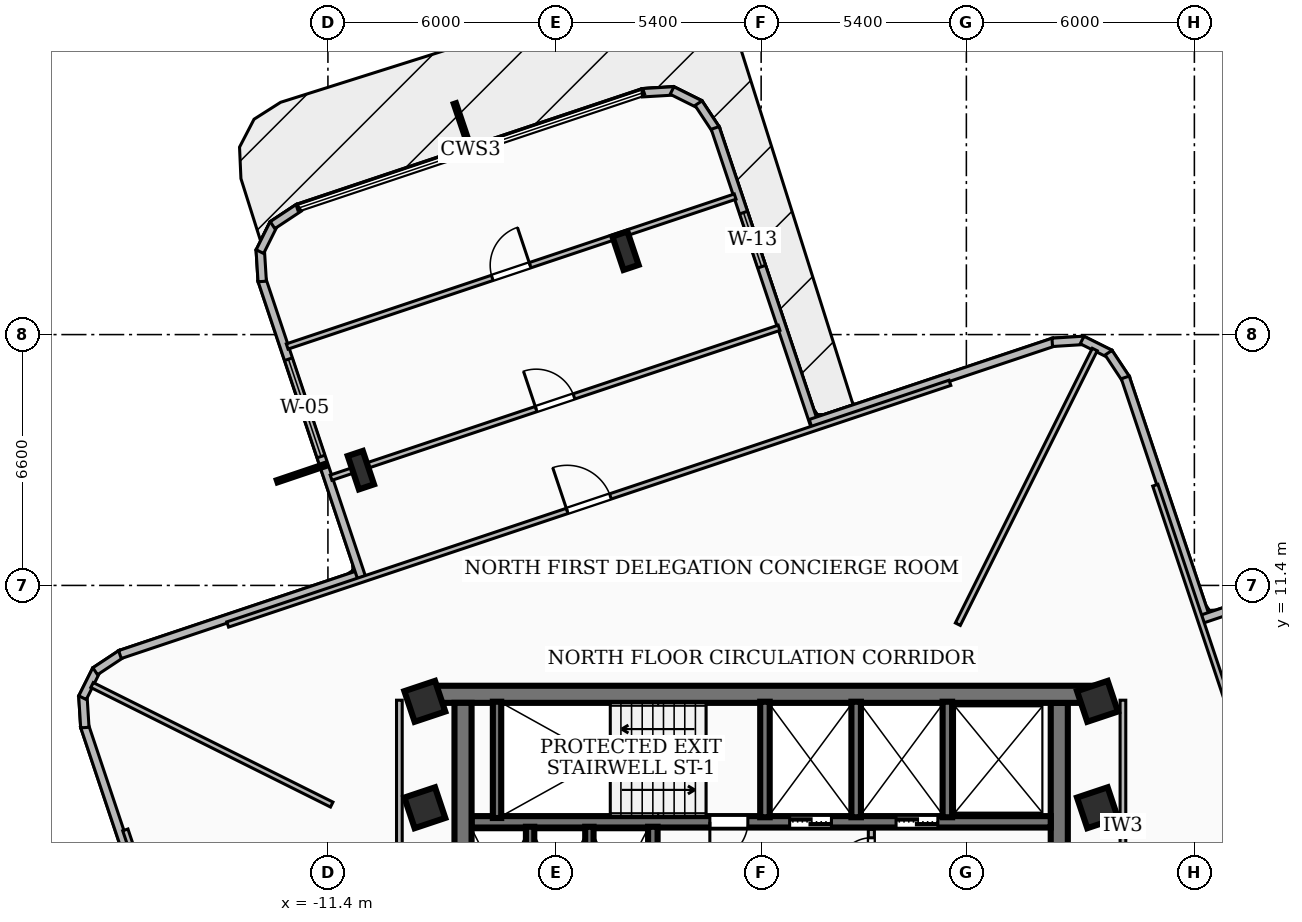
"""IFC4 building model, lengths in metres.
Left out: names, types, materials, properties, quantities, classifications, styles, units other than length and angle.
Written with IfcOpenShell. Run it as: python <this file> out.ifc"""

import sys

from ifc_helpers import new_model, si_unit, direction, frame, frame_2d, origin, origin_2d, place, context, subcontext, project, spatial, rectangle, i_section, extrude, element, fill, save


model = new_model("IFC4")
c1 = context("Model", 3, precision=1e-05, world=origin(), true_north=direction((0.0, 1.0)))
c2 = subcontext(c1, "Body", "Model", "MODEL_VIEW")
j1 = project(units=[si_unit("LENGTHUNIT", "METRE"), si_unit("PLANEANGLEUNIT", "RADIAN")], contexts=[c1])
p1 = place(None, origin())
s1 = spatial("IfcSite", under=j1, at=p1, CompositionType="ELEMENT")
p2 = place(p1, origin())
s2 = spatial("IfcBuilding", under=s1, at=p2, CompositionType="ELEMENT")
p3 = place(p2, frame((0.0, 0.0, 155.88)))
s3 = spatial("IfcBuildingStorey", under=s2, at=p3, CompositionType="ELEMENT", Elevation=155.88)
p4 = place(p3, frame((-8.78, 8.535, 0.0), z_axis=(0.0, 0.0, 1.0), x_axis=(1.0, 0.0, 0.0)))
e1 = element("IfcWall", 1, at=p4, inside=s3, PredefinedType="SHEAR", context=c2, shape_type="SweptSolid", body=[
    extrude(rectangle(XDim=17.56, YDim=0.45, at=frame_2d((8.78, 0.0))), origin(), (0.0, 0.0, 1.0), 3.34),
])
for number, where, z_axis, x_axis in (
    (2, (-7.845, 1.975, 0.0), (0.0, 0.0, 1.0), (0.0, 1.0, 0.0)),
    (3, (7.845, 8.31, 0.0), (0.0, 0.0, 1.0), (0.0, -1.0, 0.0)),
):
    element("IfcWall", number, at=place(p3, frame(where, z_axis=z_axis, x_axis=x_axis)), inside=s3, PredefinedType="SHEAR", context=c2, shape_type="SweptSolid", body=[
        extrude(rectangle(XDim=6.335, YDim=0.45, at=frame_2d((3.167, 0.0))), origin(), (0.0, 0.0, 1.0), 3.34),
    ])
p5 = place(p3, frame((7.62, 5.18, 0.0), z_axis=(0.0, 0.0, 1.0), x_axis=(-1.0, 0.0, 0.0)))
e4 = element("IfcWall", 4, at=p5, inside=s3, PredefinedType="SOLIDWALL", context=c2, shape_type="SweptSolid", body=[
    extrude(rectangle(XDim=15.24, YDim=0.3, at=frame_2d((7.62, 0.0))), origin(), (0.0, 0.0, 1.0), 3.34),
])
p6 = place(p5, frame((5.77, 0.0, 0.0)))
e5 = element("IfcOpeningElement", 5, at=p6, cuts=e4, PredefinedType="OPENING", context=c2, shape_type="SweptSolid", body=[
    extrude(rectangle(XDim=1.1, YDim=2.15, at=frame_2d((0.55, 1.075))), frame((0.0, 0.16, 0.0), z_axis=(0.0, -1.0, 0.0), x_axis=(1.0, 0.0, 0.0)), (0.0, 0.0, 1.0), 0.32),
])
p7 = place(p5, frame((2.97, 0.0, 0.0)))
e6 = element("IfcOpeningElement", 6, at=p7, cuts=e4, PredefinedType="OPENING", context=c2, shape_type="SweptSolid", body=[
    extrude(rectangle(XDim=1.1, YDim=2.15, at=frame_2d((0.55, 1.075))), frame((0.0, 0.16, 0.0), z_axis=(0.0, -1.0, 0.0), x_axis=(1.0, 0.0, 0.0)), (0.0, 0.0, 1.0), 0.32),
])
p8 = place(p5, frame((7.97, 0.0, 0.0)))
e7 = element("IfcOpeningElement", 7, at=p8, cuts=e4, PredefinedType="OPENING", context=c2, shape_type="SweptSolid", body=[
    extrude(rectangle(XDim=1.0, YDim=2.1, at=frame_2d((0.5, 1.05))), frame((0.0, 0.16, 0.0), z_axis=(0.0, -1.0, 0.0), x_axis=(1.0, 0.0, 0.0)), (0.0, 0.0, 1.0), 0.32),
])
p9 = place(p3, frame((-6.95, 5.28, 0.0), z_axis=(0.0, 0.0, 1.0), x_axis=(0.0, 1.0, 0.0)))
e8 = element("IfcWall", 8, at=p9, inside=s3, PredefinedType="SOLIDWALL", context=c2, shape_type="SweptSolid", body=[
    extrude(rectangle(XDim=3.06, YDim=0.22, at=frame_2d((1.53, 0.0))), origin(), (0.0, 0.0, 1.0), 3.34),
])
for number, where, z_axis, x_axis in (
    (9, (0.1, 5.3, 0.0), (0.0, 0.0, 1.0), (0.0, 1.0, 0.0)),
    (10, (2.5, 5.3, 0.0), (0.0, 0.0, 1.0), (0.0, 1.0, 0.0)),
    (11, (4.9, 5.3, 0.0), (0.0, 0.0, 1.0), (0.0, 1.0, 0.0)),
):
    element("IfcWall", number, at=place(p3, frame(where, z_axis=z_axis, x_axis=x_axis)), inside=s3, PredefinedType="SOLIDWALL", context=c2, shape_type="SweptSolid", body=[
        extrude(rectangle(XDim=3.04, YDim=0.25, at=frame_2d((1.52, 0.0))), origin(), (0.0, 0.0, 1.0), 3.34),
    ])
p10 = place(p3, frame((-2.85, 1.98, 0.0), z_axis=(0.0, 0.0, 1.0), x_axis=(0.0, 1.0, 0.0)))
e12 = element("IfcWall", 12, at=p10, inside=s3, PredefinedType="SOLIDWALL", context=c2, shape_type="SweptSolid", body=[
    extrude(rectangle(XDim=3.07, YDim=0.25, at=frame_2d((1.535, 0.0))), origin(), (0.0, 0.0, 1.0), 3.34),
])
for number, where, z_axis, x_axis in (
    (13, (-6.08, 1.98, 0.0), (0.0, 0.0, 1.0), (0.0, 1.0, 0.0)),
    (14, (-4.52, 1.98, 0.0), (0.0, 0.0, 1.0), (0.0, 1.0, 0.0)),
):
    element("IfcWall", number, at=place(p3, frame(where, z_axis=z_axis, x_axis=x_axis)), inside=s3, PredefinedType="SOLIDWALL", context=c2, shape_type="SweptSolid", body=[
        extrude(rectangle(XDim=3.07, YDim=0.22, at=frame_2d((1.535, 0.0))), origin(), (0.0, 0.0, 1.0), 3.34),
    ])
for number, where, z_axis, x_axis in (
    (15, (-8.85, 5.55, 0.0), (0.0, 0.0, 1.0), (0.948, 0.317, 0.0)),
    (16, (8.85, 5.55, 0.0), (0.0, 0.0, 1.0), (0.948, 0.317, 0.0)),
    (17, (-8.85, 8.35, 0.0), (0.0, 0.0, 1.0), (0.948, 0.317, 0.0)),
    (18, (8.85, 8.35, 0.0), (0.0, 0.0, 1.0), (0.948, 0.317, 0.0)),
):
    element("IfcColumn", number, at=place(p3, frame(where, z_axis=z_axis, x_axis=x_axis)), inside=s3, PredefinedType="COLUMN", context=c2, shape_type="SweptSolid", body=[
        extrude(rectangle(XDim=0.85, YDim=0.85, at=origin_2d()), origin(), (0.0, 0.0, 1.0), 3.6),
    ])
for number, where, z_axis, x_axis in (
    (19, (-3.57, 20.207, 0.0), (0.0, 0.0, 1.0), (0.948, 0.317, 0.0)),
    (20, (-10.533, 14.433, 0.0), (0.0, 0.0, 1.0), (0.948, 0.317, 0.0)),
):
    element("IfcColumn", number, at=place(p3, frame(where, z_axis=z_axis, x_axis=x_axis)), inside=s3, PredefinedType="COLUMN", context=c2, shape_type="SweptSolid", body=[
        extrude(i_section(OverallWidth=0.418, OverallDepth=0.927, WebThickness=0.019, FlangeThickness=0.032, at=origin_2d()), origin(), (0.0, 0.0, 1.0), 3.6),
    ])
p11 = place(p3, frame((-15.662, 1.3, 0.0), z_axis=(0.0, 0.0, 1.0), x_axis=(-0.317224676093, 0.948350412494, 0.0)))
e21 = element("IfcWall", 21, at=p11, inside=s3, PredefinedType="SOLIDWALL", context=c2, shape_type="SweptSolid", body=[
    extrude(rectangle(XDim=6.758, YDim=0.22, at=frame_2d((3.379, 0.0))), origin(), (0.0, 0.0, 1.0), 3.34),
])
p12 = place(p3, frame((-17.796, 7.66, 0.0), z_axis=(0.0, 0.0, 1.0), x_axis=(-0.062305442082, 0.998057128569, 0.0)))
e22 = element("IfcWall", 22, at=p12, inside=s3, PredefinedType="SOLIDWALL", context=c2, shape_type="SweptSolid", body=[
    extrude(rectangle(XDim=0.835, YDim=0.22, at=frame_2d((0.417, 0.0))), origin(), (0.0, 0.0, 1.0), 3.34),
])
p13 = place(p3, frame((-17.857, 8.446, 0.0), z_axis=(0.0, 0.0, 1.0), x_axis=(0.446258139106, 0.894904281631, 0.0)))
e23 = element("IfcWall", 23, at=p13, inside=s3, PredefinedType="SOLIDWALL", context=c2, shape_type="SweptSolid", body=[
    extrude(rectangle(XDim=0.818, YDim=0.22, at=frame_2d((0.409, 0.0))), origin(), (0.0, 0.0, 1.0), 3.34),
])
p14 = place(p3, frame((-17.524, 9.142, 0.0), z_axis=(0.0, 0.0, 1.0), x_axis=(0.833756011094, 0.552133058206, 0.0)))
e24 = element("IfcWall", 24, at=p14, inside=s3, PredefinedType="SOLIDWALL", context=c2, shape_type="SweptSolid", body=[
    extrude(rectangle(XDim=0.835, YDim=0.22, at=frame_2d((0.417, 0.0))), origin(), (0.0, 0.0, 1.0), 3.34),
])
p15 = place(p3, frame((-16.873, 9.581, 0.0), z_axis=(0.0, 0.0, 1.0), x_axis=(0.94829606055, 0.317387116224, 0.0)))
e25 = element("IfcWall", 25, at=p15, inside=s3, PredefinedType="SOLIDWALL", context=c2, shape_type="SweptSolid", body=[
    extrude(rectangle(XDim=6.758, YDim=0.22, at=frame_2d((3.379, 0.0))), origin(), (0.0, 0.0, 1.0), 3.34),
])
p16 = place(p3, frame((-10.519, 11.615, 0.0), z_axis=(0.0, 0.0, 1.0), x_axis=(-0.317229741122, 0.948348718219, 0.0)))
e26 = element("IfcWall", 26, at=p16, inside=s3, PredefinedType="SOLIDWALL", context=c2, shape_type="SweptSolid", body=[
    extrude(rectangle(XDim=8.259, YDim=0.22, at=frame_2d((4.129, 0.0))), origin(), (0.0, 0.0, 1.0), 3.34),
])
p17 = place(p16, frame((3.35, 0.0, 0.85)))
e27 = element("IfcOpeningElement", 27, at=p17, cuts=e26, PredefinedType="OPENING", context=c2, shape_type="SweptSolid", body=[
    extrude(rectangle(XDim=2.7, YDim=1.85, at=frame_2d((1.35, 0.925))), frame((0.0, 0.12, 0.0), z_axis=(0.0, -1.0, 0.0), x_axis=(1.0, 0.0, 0.0)), (0.0, 0.0, 1.0), 0.24),
])
p18 = place(p3, frame((-13.129, 19.398, 0.0), z_axis=(0.0, 0.0, 1.0), x_axis=(-0.062378286155, 0.998052578483, 0.0)))
e28 = element("IfcWall", 28, at=p18, inside=s3, PredefinedType="SOLIDWALL", context=c2, shape_type="SweptSolid", body=[
    extrude(rectangle(XDim=0.834, YDim=0.22, at=frame_2d((0.417, 0.0))), origin(), (0.0, 0.0, 1.0), 3.34),
])
p19 = place(p3, frame((-13.19, 20.183, 0.0), z_axis=(0.0, 0.0, 1.0), x_axis=(0.445781750405, 0.895141682085, 0.0)))
e29 = element("IfcWall", 29, at=p19, inside=s3, PredefinedType="SOLIDWALL", context=c2, shape_type="SweptSolid", body=[
    extrude(rectangle(XDim=0.819, YDim=0.22, at=frame_2d((0.409, 0.0))), origin(), (0.0, 0.0, 1.0), 3.34),
])
p20 = place(p3, frame((-12.857, 20.88, 0.0), z_axis=(0.0, 0.0, 1.0), x_axis=(0.833621383437, 0.552336300706, 0.0)))
e30 = element("IfcWall", 30, at=p20, inside=s3, PredefinedType="SOLIDWALL", context=c2, shape_type="SweptSolid", body=[
    extrude(rectangle(XDim=0.835, YDim=0.22, at=frame_2d((0.417, 0.0))), origin(), (0.0, 0.0, 1.0), 3.34),
])
p21 = place(p3, frame((-3.131, 24.363, 0.0), z_axis=(0.0, 0.0, 1.0), x_axis=(0.998269325078, 0.05880777677, 0.0)))
e31 = element("IfcWall", 31, at=p21, inside=s3, PredefinedType="SOLIDWALL", context=c2, shape_type="SweptSolid", body=[
    extrude(rectangle(XDim=0.834, YDim=0.22, at=frame_2d((0.417, 0.0))), origin(), (0.0, 0.0, 1.0), 3.34),
])
p22 = place(p3, frame((-2.345, 24.422, 0.0), z_axis=(0.0, 0.0, 1.0), x_axis=(0.895022680219, -0.446020629449, 0.0)))
e32 = element("IfcWall", 32, at=p22, inside=s3, PredefinedType="SOLIDWALL", context=c2, shape_type="SweptSolid", body=[
    extrude(rectangle(XDim=0.819, YDim=0.22, at=frame_2d((0.409, 0.0))), origin(), (0.0, 0.0, 1.0), 3.34),
])
p23 = place(p3, frame((-1.648, 24.089, 0.0), z_axis=(0.0, 0.0, 1.0), x_axis=(0.551319103184, -0.834294460286, 0.0)))
e33 = element("IfcWall", 33, at=p23, inside=s3, PredefinedType="SOLIDWALL", context=c2, shape_type="SweptSolid", body=[
    extrude(rectangle(XDim=0.834, YDim=0.22, at=frame_2d((0.417, 0.0))), origin(), (0.0, 0.0, 1.0), 3.34),
])
p24 = place(p3, frame((-1.21, 23.438, 0.0), z_axis=(0.0, 0.0, 1.0), x_axis=(0.317371670522, -0.948301229963, 0.0)))
e34 = element("IfcWall", 34, at=p24, inside=s3, PredefinedType="SOLIDWALL", context=c2, shape_type="SweptSolid", body=[
    extrude(rectangle(XDim=8.258, YDim=0.22, at=frame_2d((4.129, 0.0))), origin(), (0.0, 0.0, 1.0), 3.34),
])
p25 = place(p24, frame((2.35, 0.0, 0.85)))
e35 = element("IfcOpeningElement", 35, at=p25, cuts=e34, PredefinedType="OPENING", context=c2, shape_type="SweptSolid", body=[
    extrude(rectangle(XDim=1.5, YDim=1.8, at=frame_2d((0.75, 0.9))), frame((0.0, 0.12, 0.0), z_axis=(0.0, -1.0, 0.0), x_axis=(1.0, 0.0, 0.0)), (0.0, 0.0, 1.0), 0.24),
])
p26 = place(p3, frame((1.3, 15.662, 0.0), z_axis=(0.0, 0.0, 1.0), x_axis=(0.948350412494, 0.317224676093, 0.0)))
e36 = element("IfcWall", 36, at=p26, inside=s3, PredefinedType="SOLIDWALL", context=c2, shape_type="SweptSolid", body=[
    extrude(rectangle(XDim=6.758, YDim=0.22, at=frame_2d((3.379, 0.0))), origin(), (0.0, 0.0, 1.0), 3.34),
])
p27 = place(p3, frame((7.66, 17.796, 0.0), z_axis=(0.0, 0.0, 1.0), x_axis=(0.998057128569, 0.062305442082, 0.0)))
e37 = element("IfcWall", 37, at=p27, inside=s3, PredefinedType="SOLIDWALL", context=c2, shape_type="SweptSolid", body=[
    extrude(rectangle(XDim=0.835, YDim=0.22, at=frame_2d((0.417, 0.0))), origin(), (0.0, 0.0, 1.0), 3.34),
])
p28 = place(p3, frame((8.446, 17.857, 0.0), z_axis=(0.0, 0.0, 1.0), x_axis=(0.894904281631, -0.446258139106, 0.0)))
e38 = element("IfcWall", 38, at=p28, inside=s3, PredefinedType="SOLIDWALL", context=c2, shape_type="SweptSolid", body=[
    extrude(rectangle(XDim=0.818, YDim=0.22, at=frame_2d((0.409, 0.0))), origin(), (0.0, 0.0, 1.0), 3.34),
])
p29 = place(p3, frame((9.142, 17.524, 0.0), z_axis=(0.0, 0.0, 1.0), x_axis=(0.552133058206, -0.833756011094, 0.0)))
e39 = element("IfcWall", 39, at=p29, inside=s3, PredefinedType="SOLIDWALL", context=c2, shape_type="SweptSolid", body=[
    extrude(rectangle(XDim=0.835, YDim=0.22, at=frame_2d((0.417, 0.0))), origin(), (0.0, 0.0, 1.0), 3.34),
])
p30 = place(p3, frame((9.581, 16.873, 0.0), z_axis=(0.0, 0.0, 1.0), x_axis=(0.317387116224, -0.94829606055, 0.0)))
e40 = element("IfcWall", 40, at=p30, inside=s3, PredefinedType="SOLIDWALL", context=c2, shape_type="SweptSolid", body=[
    extrude(rectangle(XDim=6.758, YDim=0.22, at=frame_2d((3.379, 0.0))), origin(), (0.0, 0.0, 1.0), 3.34),
])
p31 = place(p3, frame((11.615, 10.519, 0.0), z_axis=(0.0, 0.0, 1.0), x_axis=(0.948331055834, 0.317282537404, 0.0)))
e41 = element("IfcWall", 41, at=p31, inside=s3, PredefinedType="SOLIDWALL", context=c2, shape_type="SweptSolid", body=[
    extrude(rectangle(XDim=9.858, YDim=0.22, at=frame_2d((4.929, 0.0))), origin(), (0.0, 0.0, 1.0), 3.34),
])
p32 = place(p31, frame((6.34, 0.0, 0.85)))
e42 = element("IfcOpeningElement", 42, at=p32, cuts=e41, PredefinedType="OPENING", context=c2, shape_type="SweptSolid", body=[
    extrude(rectangle(XDim=2.7, YDim=1.65, at=frame_2d((1.35, 0.825))), frame((0.0, 0.12, 0.0), z_axis=(0.0, -1.0, 0.0), x_axis=(1.0, 0.0, 0.0)), (0.0, 0.0, 1.0), 0.24),
])
p33 = place(p3, frame((2.9, 2.04, 0.0), z_axis=(0.0, 0.0, 1.0), x_axis=(0.0, 1.0, 0.0)))
e43 = element("IfcWall", 43, at=p33, inside=s3, PredefinedType="PARTITIONING", context=c2, shape_type="SweptSolid", body=[
    extrude(rectangle(XDim=2.94, YDim=0.16, at=frame_2d((1.47, 0.0))), origin(), (0.0, 0.0, 1.0), 2.57),
])
p34 = place(p33, frame((1.82, 0.0, 0.0)))
e44 = element("IfcOpeningElement", 44, at=p34, cuts=e43, PredefinedType="OPENING", context=c2, shape_type="SweptSolid", body=[
    extrude(rectangle(XDim=0.9, YDim=2.06, at=frame_2d((0.45, 1.03))), frame((0.0, 0.09, 0.0), z_axis=(0.0, -1.0, 0.0), x_axis=(1.0, 0.0, 0.0)), (0.0, 0.0, 1.0), 0.18),
])
p35 = place(p3, frame((-9.52, 1.75, 0.0), z_axis=(0.0, 0.0, 1.0), x_axis=(0.0, 1.0, 0.0)))
e45 = element("IfcWall", 45, at=p35, inside=s3, PredefinedType="PARTITIONING", context=c2, shape_type="SweptSolid", body=[
    extrude(rectangle(XDim=6.63, YDim=0.15, at=frame_2d((3.315, 0.0))), origin(), (0.0, 0.0, 1.0), 3.34),
])
p36 = place(p3, frame((9.52, 1.75, 0.0), z_axis=(0.0, 0.0, 1.0), x_axis=(0.0, 1.0, 0.0)))
e46 = element("IfcWall", 46, at=p36, inside=s3, PredefinedType="PARTITIONING", context=c2, shape_type="SweptSolid", body=[
    extrude(rectangle(XDim=6.63, YDim=0.15, at=frame_2d((3.315, 0.0))), origin(), (0.0, 0.0, 1.0), 2.644),
])
p37 = place(p3, frame((5.176, 10.38, 0.0), z_axis=(0.0, 0.0, 1.0), x_axis=(0.446173290391, 0.894946587759, 0.0)))
e47 = element("IfcWall", 47, at=p37, inside=s3, PredefinedType="PARTITIONING", context=c2, shape_type="SweptSolid", body=[
    extrude(rectangle(XDim=8.075, YDim=0.145, at=frame_2d((4.038, 0.0))), origin(), (0.0, 0.0, 1.0), 3.34),
])
p38 = place(p3, frame((-11.3, 5.634, 0.0), z_axis=(0.0, 0.0, 1.0), x_axis=(-0.894904738475, 0.446257222972, 0.0)))
e48 = element("IfcWall", 48, at=p38, inside=s3, PredefinedType="PARTITIONING", context=c2, shape_type="SweptSolid", body=[
    extrude(rectangle(XDim=7.048, YDim=0.145, at=frame_2d((3.524, 0.0))), origin(), (0.0, 0.0, 1.0), 3.34),
])
p39 = place(p3, frame((10.372, 14.037, 0.0), z_axis=(0.0, 0.0, 1.0), x_axis=(0.317298382655, -0.94832575435, 0.0)))
e49 = element("IfcWall", 49, at=p39, inside=s3, PredefinedType="PARTITIONING", context=c2, shape_type="SweptSolid", body=[
    extrude(rectangle(XDim=20.041, YDim=0.145, at=frame_2d((10.021, 0.0))), origin(), (0.0, 0.0, 1.0), 2.644),
])
p40 = place(p39, frame((9.42, 0.0, 0.0)))
e50 = element("IfcOpeningElement", 50, at=p40, cuts=e49, PredefinedType="OPENING", context=c2, shape_type="SweptSolid", body=[
    extrude(rectangle(XDim=1.2, YDim=2.1, at=frame_2d((0.6, 1.05))), frame((0.0, 0.083, 0.0), z_axis=(0.0, -1.0, 0.0), x_axis=(1.0, 0.0, 0.0)), (0.0, 0.0, 1.0), 0.165),
])
p41 = place(p3, frame((-14.037, 10.372, 0.0), z_axis=(0.0, 0.0, 1.0), x_axis=(0.94832575435, 0.317298382655, 0.0)))
e51 = element("IfcWall", 51, at=p41, inside=s3, PredefinedType="PARTITIONING", context=c2, shape_type="SweptSolid", body=[
    extrude(rectangle(XDim=20.041, YDim=0.145, at=frame_2d((10.021, 0.0))), origin(), (0.0, 0.0, 1.0), 2.644),
])
p42 = place(p41, frame((9.42, 0.0, 0.0)))
e52 = element("IfcOpeningElement", 52, at=p42, cuts=e51, PredefinedType="OPENING", context=c2, shape_type="SweptSolid", body=[
    extrude(rectangle(XDim=1.2, YDim=2.1, at=frame_2d((0.6, 1.05))), frame((0.0, 0.083, 0.0), z_axis=(0.0, -1.0, 0.0), x_axis=(1.0, 0.0, 0.0)), (0.0, 0.0, 1.0), 0.165),
])
p43 = place(p3, frame((-11.317, 14.235, 0.0), z_axis=(0.0, 0.0, 1.0), x_axis=(0.948331136084, 0.317282297544, 0.0)))
e53 = element("IfcWall", 53, at=p43, inside=s3, PredefinedType="PARTITIONING", context=c2, shape_type="SweptSolid", body=[
    extrude(rectangle(XDim=12.43, YDim=0.145, at=frame_2d((6.215, 0.0))), origin(), (0.0, 0.0, 1.0), 2.644),
])
p44 = place(p43, frame((5.69, 0.0, 0.0)))
e54 = element("IfcOpeningElement", 54, at=p44, cuts=e53, PredefinedType="OPENING", context=c2, shape_type="SweptSolid", body=[
    extrude(rectangle(XDim=1.05, YDim=2.08, at=frame_2d((0.525, 1.04))), frame((0.0, 0.083, 0.0), z_axis=(0.0, -1.0, 0.0), x_axis=(1.0, 0.0, 0.0)), (0.0, 0.0, 1.0), 0.165),
])
p45 = place(p3, frame((-12.472, 17.687, 0.0), z_axis=(0.0, 0.0, 1.0), x_axis=(0.948325226172, 0.317299961245, 0.0)))
e55 = element("IfcWall", 55, at=p45, inside=s3, PredefinedType="PARTITIONING", context=c2, shape_type="SweptSolid", body=[
    extrude(rectangle(XDim=12.43, YDim=0.145, at=frame_2d((6.215, 0.0))), origin(), (0.0, 0.0, 1.0), 3.34),
])
p46 = place(p45, frame((5.69, 0.0, 0.0)))
e56 = element("IfcOpeningElement", 56, at=p46, cuts=e55, PredefinedType="OPENING", context=c2, shape_type="SweptSolid", body=[
    extrude(rectangle(XDim=1.05, YDim=2.08, at=frame_2d((0.525, 1.04))), frame((0.0, 0.083, 0.0), z_axis=(0.0, -1.0, 0.0), x_axis=(1.0, 0.0, 0.0)), (0.0, 0.0, 1.0), 0.165),
])
p47 = place(p3, frame((-10.372, -14.037, 0.0), z_axis=(0.0, 0.0, 1.0), x_axis=(-0.317298382655, 0.94832575435, 0.0)))
e57 = element("IfcWall", 57, at=p47, inside=s3, PredefinedType="PARTITIONING", context=c2, shape_type="SweptSolid", body=[
    extrude(rectangle(XDim=20.041, YDim=0.145, at=frame_2d((10.021, 0.0))), origin(), (0.0, 0.0, 1.0), 2.644),
])
p48 = place(p47, frame((9.42, 0.0, 0.0)))
e58 = element("IfcOpeningElement", 58, at=p48, cuts=e57, PredefinedType="OPENING", context=c2, shape_type="SweptSolid", body=[
    extrude(rectangle(XDim=1.2, YDim=2.1, at=frame_2d((0.6, 1.05))), frame((0.0, 0.083, 0.0), z_axis=(0.0, -1.0, 0.0), x_axis=(1.0, 0.0, 0.0)), (0.0, 0.0, 1.0), 0.165),
])
p49 = place(p17, origin())
e59 = element("IfcWindow", 59, at=p49, inside=s3, PartitioningType="SINGLE_PANEL", PredefinedType="WINDOW", context=c2, shape_type="SweptSolid", body=[
    extrude(rectangle(XDim=2.7, YDim=1.85, at=frame_2d((1.35, 0.925))), frame((0.0, 0.03, 0.0), z_axis=(0.0, -1.0, 0.0), x_axis=(1.0, 0.0, 0.0)), (0.0, 0.0, 1.0), 0.06),
])
fill(e27, e59)
p50 = place(p25, origin())
e60 = element("IfcWindow", 60, at=p50, inside=s3, PartitioningType="SINGLE_PANEL", PredefinedType="WINDOW", context=c2, shape_type="SweptSolid", body=[
    extrude(rectangle(XDim=1.5, YDim=1.8, at=frame_2d((0.75, 0.9))), frame((0.0, 0.03, 0.0), z_axis=(0.0, -1.0, 0.0), x_axis=(1.0, 0.0, 0.0)), (0.0, 0.0, 1.0), 0.06),
])
fill(e35, e60)
p51 = place(p6, origin())
e61 = element("IfcDoor", 61, at=p51, inside=s3, OperationType="DOUBLE_DOOR_SLIDING", PredefinedType="DOOR", context=c2, shape_type="SweptSolid", body=[
    extrude(rectangle(XDim=1.1, YDim=2.15, at=frame_2d((0.55, 1.075))), frame((0.0, 0.025, 0.0), z_axis=(0.0, -1.0, 0.0), x_axis=(1.0, 0.0, 0.0)), (0.0, 0.0, 1.0), 0.05),
])
fill(e5, e61)
p52 = place(p7, origin())
e62 = element("IfcDoor", 62, at=p52, inside=s3, OperationType="DOUBLE_DOOR_SLIDING", PredefinedType="DOOR", context=c2, shape_type="SweptSolid", body=[
    extrude(rectangle(XDim=1.1, YDim=2.15, at=frame_2d((0.55, 1.075))), frame((0.0, 0.025, 0.0), z_axis=(0.0, -1.0, 0.0), x_axis=(1.0, 0.0, 0.0)), (0.0, 0.0, 1.0), 0.05),
])
fill(e6, e62)
p53 = place(p8, origin())
e63 = element("IfcDoor", 63, at=p53, inside=s3, OperationType="SINGLE_SWING_RIGHT", PredefinedType="DOOR", context=c2, shape_type="SweptSolid", body=[
    extrude(rectangle(XDim=1.0, YDim=2.1, at=frame_2d((0.5, 1.05))), frame((0.0, 0.025, 0.0), z_axis=(0.0, -1.0, 0.0), x_axis=(1.0, 0.0, 0.0)), (0.0, 0.0, 1.0), 0.05),
])
fill(e7, e63)
p54 = place(p34, origin())
e64 = element("IfcDoor", 64, at=p54, inside=s3, OperationType="SINGLE_SWING_LEFT", PredefinedType="DOOR", context=c2, shape_type="SweptSolid", body=[
    extrude(rectangle(XDim=0.9, YDim=2.06, at=frame_2d((0.45, 1.03))), frame((0.0, 0.025, 0.0), z_axis=(0.0, -1.0, 0.0), x_axis=(1.0, 0.0, 0.0)), (0.0, 0.0, 1.0), 0.05),
])
fill(e44, e64)
p55 = place(p42, origin())
e65 = element("IfcDoor", 65, at=p55, inside=s3, OperationType="SINGLE_SWING_LEFT", PredefinedType="DOOR", context=c2, shape_type="SweptSolid", body=[
    extrude(rectangle(XDim=1.2, YDim=2.1, at=frame_2d((0.6, 1.05))), frame((0.0, 0.025, 0.0), z_axis=(0.0, -1.0, 0.0), x_axis=(1.0, 0.0, 0.0)), (0.0, 0.0, 1.0), 0.05),
])
fill(e52, e65)
p56 = place(p44, origin())
e66 = element("IfcDoor", 66, at=p56, inside=s3, OperationType="SINGLE_SWING_LEFT", PredefinedType="DOOR", context=c2, shape_type="SweptSolid", body=[
    extrude(rectangle(XDim=1.05, YDim=2.08, at=frame_2d((0.525, 1.04))), frame((0.0, 0.025, 0.0), z_axis=(0.0, -1.0, 0.0), x_axis=(1.0, 0.0, 0.0)), (0.0, 0.0, 1.0), 0.05),
])
fill(e54, e66)
p57 = place(p46, origin())
e67 = element("IfcDoor", 67, at=p57, inside=s3, OperationType="SINGLE_SWING_RIGHT", PredefinedType="DOOR", context=c2, shape_type="SweptSolid", body=[
    extrude(rectangle(XDim=1.05, YDim=2.08, at=frame_2d((0.525, 1.04))), frame((0.0, 0.025, 0.0), z_axis=(0.0, -1.0, 0.0), x_axis=(1.0, 0.0, 0.0)), (0.0, 0.0, 1.0), 0.05),
])
fill(e56, e67)
save(model, sys.argv[1])
